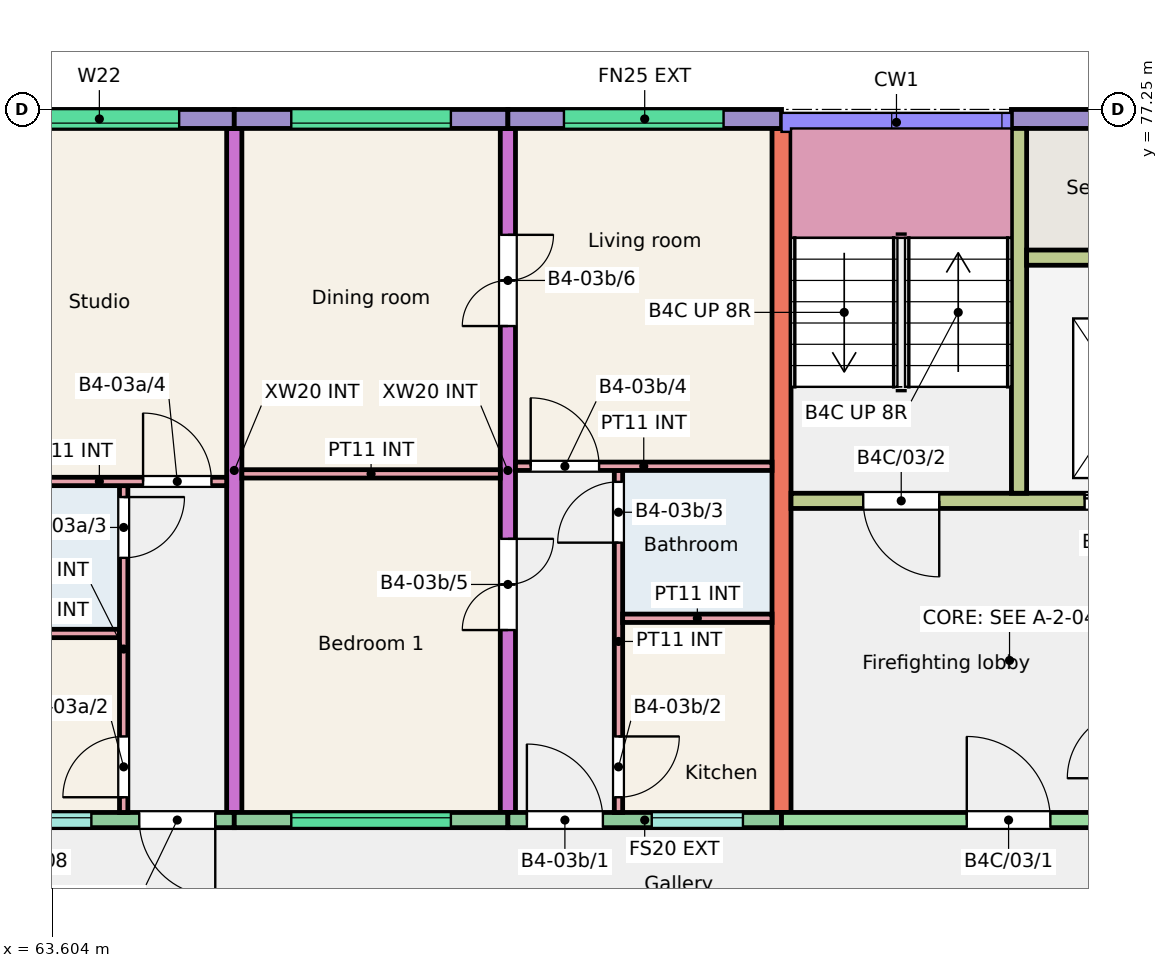
"""IFC4 building model, lengths in metres.
Left out: names, types, materials, properties, quantities, classifications, styles, units other than length and angle.
Written with IfcOpenShell. Run it as: python <this file> out.ifc"""

import sys

from ifc_helpers import new_model, si_unit, direction, frame, frame_2d, origin, place, context, subcontext, project, spatial, rectangle, extrude, element, fill, save


model = new_model("IFC4")
c1 = context("Model", 3, precision=1e-05, world=origin(), true_north=direction((0.0, 1.0)))
c2 = subcontext(c1, "Body", "Model", "MODEL_VIEW")
j1 = project(units=[si_unit("LENGTHUNIT", "METRE"), si_unit("PLANEANGLEUNIT", "RADIAN")], contexts=[c1])
p1 = place(None, origin())
s1 = spatial("IfcSite", under=j1, at=p1, CompositionType="ELEMENT")
p2 = place(p1, origin())
s2 = spatial("IfcBuilding", under=s1, at=p2, CompositionType="ELEMENT")
p3 = place(p2, frame((0.0, 0.0, 9.0)))
s3 = spatial("IfcBuildingStorey", under=s2, at=p3, CompositionType="ELEMENT", Elevation=9.0)
p4 = place(p3, frame((66.0, 68.0, 0.0), z_axis=(0.0, 0.0, 1.0), x_axis=(0.0, 1.0, 0.0)))
e1 = element("IfcWall", 1, at=p4, inside=s3, PredefinedType="SHEAR", context=c2, shape_type="SweptSolid", body=[
    extrude(rectangle(XDim=9.0, YDim=0.2, at=frame_2d((4.5, 0.0))), origin(), (0.0, 0.0, 1.0), 3.0),
])
p5 = place(p3, frame((69.6, 68.0, 0.0), z_axis=(0.0, 0.0, 1.0), x_axis=(0.0, 1.0, 0.0)))
e2 = element("IfcWall", 2, at=p5, inside=s3, PredefinedType="SHEAR", context=c2, shape_type="SweptSolid", body=[
    extrude(rectangle(XDim=9.0, YDim=0.2, at=frame_2d((4.5, 0.0))), origin(), (0.0, 0.0, 1.0), 3.0),
])
p6 = place(p5, frame((2.4, 0.0, 0.0)))
e3 = element("IfcOpeningElement", 3, at=p6, cuts=e2, PredefinedType="OPENING", context=c2, shape_type="SweptSolid", body=[
    extrude(rectangle(XDim=1.2, YDim=2.1, at=frame_2d((0.6, 1.05))), frame((0.0, 0.11, 0.0), z_axis=(0.0, -1.0, 0.0), x_axis=(1.0, 0.0, 0.0)), (0.0, 0.0, 1.0), 0.22),
])
p7 = place(p5, frame((6.4, 0.0, 0.0)))
e4 = element("IfcOpeningElement", 4, at=p7, cuts=e2, PredefinedType="OPENING", context=c2, shape_type="SweptSolid", body=[
    extrude(rectangle(XDim=1.2, YDim=2.1, at=frame_2d((0.6, 1.05))), frame((0.0, 0.11, 0.0), z_axis=(0.0, -1.0, 0.0), x_axis=(1.0, 0.0, 0.0)), (0.0, 0.0, 1.0), 0.22),
])
p8 = place(p3, frame((73.2, 68.0, 0.0), z_axis=(0.0, 0.0, 1.0), x_axis=(0.0, 1.0, 0.0)))
e5 = element("IfcWall", 5, at=p8, inside=s3, PredefinedType="SHEAR", context=c2, shape_type="SweptSolid", body=[
    extrude(rectangle(XDim=9.0, YDim=0.25, at=frame_2d((4.5, 0.0))), origin(), (0.0, 0.0, 1.0), 3.0),
])
p9 = place(p3, frame((62.4, 77.125, 0.0), z_axis=(0.0, 0.0, 1.0), x_axis=(1.0, 0.0, 0.0)))
e6 = element("IfcWall", 6, at=p9, inside=s3, PredefinedType="SOLIDWALL", context=c2, shape_type="SweptSolid", body=[
    extrude(rectangle(XDim=3.6, YDim=0.25, at=frame_2d((1.8, 0.0))), origin(), (0.0, 0.0, 1.0), 3.0),
])
p10 = place(p9, frame((0.775, 0.0, 1.2)))
e7 = element("IfcOpeningElement", 7, at=p10, cuts=e6, PredefinedType="OPENING", context=c2, shape_type="SweptSolid", body=[
    extrude(rectangle(XDim=2.1, YDim=1.2, at=frame_2d((1.05, 0.6))), frame((0.0, 0.135, 0.0), z_axis=(0.0, -1.0, 0.0), x_axis=(1.0, 0.0, 0.0)), (0.0, 0.0, 1.0), 0.27),
])
p11 = place(p3, frame((62.55, 67.9, 0.0), z_axis=(0.0, 0.0, 1.0), x_axis=(1.0, 0.0, 0.0)))
e8 = element("IfcWall", 8, at=p11, inside=s3, PredefinedType="SOLIDWALL", context=c2, shape_type="SweptSolid", body=[
    extrude(rectangle(XDim=3.45, YDim=0.2, at=frame_2d((1.725, 0.0))), origin(), (0.0, 0.0, 1.0), 3.0),
])
p12 = place(p11, frame((0.37, 0.0, 1.1)))
e9 = element("IfcOpeningElement", 9, at=p12, cuts=e8, PredefinedType="OPENING", context=c2, shape_type="SweptSolid", body=[
    extrude(rectangle(XDim=1.2, YDim=1.3, at=frame_2d((0.6, 0.65))), frame((0.0, 0.11, 0.0), z_axis=(0.0, -1.0, 0.0), x_axis=(1.0, 0.0, 0.0)), (0.0, 0.0, 1.0), 0.22),
])
p13 = place(p11, frame((2.2, 0.0, 0.0)))
e10 = element("IfcOpeningElement", 10, at=p13, cuts=e8, PredefinedType="OPENING", context=c2, shape_type="SweptSolid", body=[
    extrude(rectangle(XDim=1.0, YDim=2.1, at=frame_2d((0.5, 1.05))), frame((0.0, 0.11, 0.0), z_axis=(0.0, -1.0, 0.0), x_axis=(1.0, 0.0, 0.0)), (0.0, 0.0, 1.0), 0.22),
])
p14 = place(p3, frame((66.0, 77.125, 0.0), z_axis=(0.0, 0.0, 1.0), x_axis=(1.0, 0.0, 0.0)))
e11 = element("IfcWall", 11, at=p14, inside=s3, PredefinedType="SOLIDWALL", context=c2, shape_type="SweptSolid", body=[
    extrude(rectangle(XDim=3.6, YDim=0.25, at=frame_2d((1.8, 0.0))), origin(), (0.0, 0.0, 1.0), 3.0),
])
p15 = place(p14, frame((0.75, 0.0, 1.2)))
e12 = element("IfcOpeningElement", 12, at=p15, cuts=e11, PredefinedType="OPENING", context=c2, shape_type="SweptSolid", body=[
    extrude(rectangle(XDim=2.1, YDim=1.2, at=frame_2d((1.05, 0.6))), frame((0.0, 0.135, 0.0), z_axis=(0.0, -1.0, 0.0), x_axis=(1.0, 0.0, 0.0)), (0.0, 0.0, 1.0), 0.27),
])
p16 = place(p3, frame((66.0, 67.9, 0.0), z_axis=(0.0, 0.0, 1.0), x_axis=(1.0, 0.0, 0.0)))
e13 = element("IfcWall", 13, at=p16, inside=s3, PredefinedType="SOLIDWALL", context=c2, shape_type="SweptSolid", body=[
    extrude(rectangle(XDim=3.6, YDim=0.2, at=frame_2d((1.8, 0.0))), origin(), (0.0, 0.0, 1.0), 3.0),
])
p17 = place(p16, frame((0.75, 0.0, 1.2)))
e14 = element("IfcOpeningElement", 14, at=p17, cuts=e13, PredefinedType="OPENING", context=c2, shape_type="SweptSolid", body=[
    extrude(rectangle(XDim=2.1, YDim=1.2, at=frame_2d((1.05, 0.6))), frame((0.0, 0.11, 0.0), z_axis=(0.0, -1.0, 0.0), x_axis=(1.0, 0.0, 0.0)), (0.0, 0.0, 1.0), 0.22),
])
p18 = place(p3, frame((69.6, 77.125, 0.0), z_axis=(0.0, 0.0, 1.0), x_axis=(1.0, 0.0, 0.0)))
e15 = element("IfcWall", 15, at=p18, inside=s3, PredefinedType="SOLIDWALL", context=c2, shape_type="SweptSolid", body=[
    extrude(rectangle(XDim=3.6, YDim=0.25, at=frame_2d((1.8, 0.0))), origin(), (0.0, 0.0, 1.0), 3.0),
])
p19 = place(p18, frame((0.738, 0.0, 1.2)))
e16 = element("IfcOpeningElement", 16, at=p19, cuts=e15, PredefinedType="OPENING", context=c2, shape_type="SweptSolid", body=[
    extrude(rectangle(XDim=2.1, YDim=1.2, at=frame_2d((1.05, 0.6))), frame((0.0, 0.135, 0.0), z_axis=(0.0, -1.0, 0.0), x_axis=(1.0, 0.0, 0.0)), (0.0, 0.0, 1.0), 0.27),
])
p20 = place(p3, frame((69.6, 67.9, 0.0), z_axis=(0.0, 0.0, 1.0), x_axis=(1.0, 0.0, 0.0)))
e17 = element("IfcWall", 17, at=p20, inside=s3, PredefinedType="SOLIDWALL", context=c2, shape_type="SweptSolid", body=[
    extrude(rectangle(XDim=3.6, YDim=0.2, at=frame_2d((1.8, 0.0))), origin(), (0.0, 0.0, 1.0), 3.0),
])
p21 = place(p20, frame((1.893, 0.0, 1.1)))
e18 = element("IfcOpeningElement", 18, at=p21, cuts=e17, PredefinedType="OPENING", context=c2, shape_type="SweptSolid", body=[
    extrude(rectangle(XDim=1.2, YDim=1.3, at=frame_2d((0.6, 0.65))), frame((0.0, 0.11, 0.0), z_axis=(0.0, -1.0, 0.0), x_axis=(1.0, 0.0, 0.0)), (0.0, 0.0, 1.0), 0.22),
])
p22 = place(p20, frame((0.25, 0.0, 0.0)))
e19 = element("IfcOpeningElement", 19, at=p22, cuts=e17, PredefinedType="OPENING", context=c2, shape_type="SweptSolid", body=[
    extrude(rectangle(XDim=1.0, YDim=2.1, at=frame_2d((0.5, 1.05))), frame((0.0, 0.11, 0.0), z_axis=(0.0, -1.0, 0.0), x_axis=(1.0, 0.0, 0.0)), (0.0, 0.0, 1.0), 0.22),
])
p23 = place(p3, frame((76.225, 77.125, 0.0), z_axis=(0.0, 0.0, 1.0), x_axis=(1.0, 0.0, 0.0)))
e20 = element("IfcWall", 20, at=p23, inside=s3, PredefinedType="SOLIDWALL", context=c2, shape_type="SweptSolid", body=[
    extrude(rectangle(XDim=2.975, YDim=0.25, at=frame_2d((1.487, 0.0))), origin(), (0.0, 0.0, 1.0), 3.0),
])
p24 = place(p3, frame((73.2, 67.9, 0.0), z_axis=(0.0, 0.0, 1.0), x_axis=(1.0, 0.0, 0.0)))
e21 = element("IfcWall", 21, at=p24, inside=s3, PredefinedType="SHEAR", context=c2, shape_type="SweptSolid", body=[
    extrude(rectangle(XDim=5.85, YDim=0.2, at=frame_2d((2.925, 0.0))), origin(), (0.0, 0.0, 1.0), 3.0),
])
p25 = place(p24, frame((2.438, 0.0, 0.0)))
e22 = element("IfcOpeningElement", 22, at=p25, cuts=e21, PredefinedType="OPENING", context=c2, shape_type="SweptSolid", body=[
    extrude(rectangle(XDim=1.1, YDim=2.1, at=frame_2d((0.55, 1.05))), frame((0.0, 0.11, 0.0), z_axis=(0.0, -1.0, 0.0), x_axis=(1.0, 0.0, 0.0)), (0.0, 0.0, 1.0), 0.22),
])
p26 = place(p3, frame((73.325, 72.1, 0.0), z_axis=(0.0, 0.0, 1.0), x_axis=(1.0, 0.0, 0.0)))
e23 = element("IfcWall", 23, at=p26, inside=s3, PredefinedType="SHEAR", context=c2, shape_type="SweptSolid", body=[
    extrude(rectangle(XDim=5.725, YDim=0.2, at=frame_2d((2.863, 0.0))), origin(), (0.0, 0.0, 1.0), 3.0),
])
p27 = place(p26, frame((0.95, 0.0, 0.0)))
e24 = element("IfcOpeningElement", 24, at=p27, cuts=e23, PredefinedType="OPENING", context=c2, shape_type="SweptSolid", body=[
    extrude(rectangle(XDim=1.0, YDim=2.1, at=frame_2d((0.5, 1.05))), frame((0.0, 0.11, 0.0), z_axis=(0.0, -1.0, 0.0), x_axis=(1.0, 0.0, 0.0)), (0.0, 0.0, 1.0), 0.22),
])
p28 = place(p26, frame((3.863, 0.0, 0.0)))
e25 = element("IfcOpeningElement", 25, at=p28, cuts=e23, PredefinedType="OPENING", context=c2, shape_type="SweptSolid", body=[
    extrude(rectangle(XDim=1.1, YDim=2.1, at=frame_2d((0.55, 1.05))), frame((0.0, 0.11, 0.0), z_axis=(0.0, -1.0, 0.0), x_axis=(1.0, 0.0, 0.0)), (0.0, 0.0, 1.0), 0.22),
])
p29 = place(p3, frame((76.325, 72.2, 0.0), z_axis=(0.0, 0.0, 1.0), x_axis=(0.0, 1.0, 0.0)))
e26 = element("IfcWall", 26, at=p29, inside=s3, PredefinedType="SHEAR", context=c2, shape_type="SweptSolid", body=[
    extrude(rectangle(XDim=4.8, YDim=0.2, at=frame_2d((2.4, 0.0))), origin(), (0.0, 0.0, 1.0), 3.0),
])
p30 = place(p3, frame((76.425, 75.3, 0.0), z_axis=(0.0, 0.0, 1.0), x_axis=(1.0, 0.0, 0.0)))
e27 = element("IfcWall", 27, at=p30, inside=s3, PredefinedType="SHEAR", context=c2, shape_type="SweptSolid", body=[
    extrude(rectangle(XDim=2.625, YDim=0.2, at=frame_2d((1.312, 0.0))), origin(), (0.0, 0.0, 1.0), 3.0),
])
p31 = place(p3, frame((62.55, 70.355, 0.0), z_axis=(0.0, 0.0, 1.0), x_axis=(1.0, 0.0, 0.0)))
e28 = element("IfcWall", 28, at=p31, inside=s3, PredefinedType="PARTITIONING", context=c2, shape_type="SweptSolid", body=[
    extrude(rectangle(XDim=1.94, YDim=0.11, at=frame_2d((0.97, 0.0))), origin(), (0.0, 0.0, 1.0), 2.8),
])
p32 = place(p3, frame((64.545, 68.0, 0.0), z_axis=(0.0, 0.0, 1.0), x_axis=(0.0, 1.0, 0.0)))
e29 = element("IfcWall", 29, at=p32, inside=s3, PredefinedType="PARTITIONING", context=c2, shape_type="SweptSolid", body=[
    extrude(rectangle(XDim=4.3, YDim=0.11, at=frame_2d((2.15, 0.0))), origin(), (0.0, 0.0, 1.0), 2.8),
])
p33 = place(p32, frame((0.2, 0.0, 0.0)))
e30 = element("IfcOpeningElement", 30, at=p33, cuts=e29, PredefinedType="OPENING", context=c2, shape_type="SweptSolid", body=[
    extrude(rectangle(XDim=0.8, YDim=2.1, at=frame_2d((0.4, 1.05))), frame((0.0, 0.065, 0.0), z_axis=(0.0, -1.0, 0.0), x_axis=(1.0, 0.0, 0.0)), (0.0, 0.0, 1.0), 0.13),
])
p34 = place(p32, frame((3.35, 0.0, 0.0)))
e31 = element("IfcOpeningElement", 31, at=p34, cuts=e29, PredefinedType="OPENING", context=c2, shape_type="SweptSolid", body=[
    extrude(rectangle(XDim=0.8, YDim=2.1, at=frame_2d((0.4, 1.05))), frame((0.0, 0.065, 0.0), z_axis=(0.0, -1.0, 0.0), x_axis=(1.0, 0.0, 0.0)), (0.0, 0.0, 1.0), 0.13),
])
p35 = place(p3, frame((62.55, 72.355, 0.0), z_axis=(0.0, 0.0, 1.0), x_axis=(1.0, 0.0, 0.0)))
e32 = element("IfcWall", 32, at=p35, inside=s3, PredefinedType="PARTITIONING", context=c2, shape_type="SweptSolid", body=[
    extrude(rectangle(XDim=3.35, YDim=0.11, at=frame_2d((1.675, 0.0))), origin(), (0.0, 0.0, 1.0), 2.8),
])
p36 = place(p35, frame((2.25, 0.0, 0.0)))
e33 = element("IfcOpeningElement", 33, at=p36, cuts=e32, PredefinedType="OPENING", context=c2, shape_type="SweptSolid", body=[
    extrude(rectangle(XDim=0.9, YDim=2.1, at=frame_2d((0.45, 1.05))), frame((0.0, 0.065, 0.0), z_axis=(0.0, -1.0, 0.0), x_axis=(1.0, 0.0, 0.0)), (0.0, 0.0, 1.0), 0.13),
])
p37 = place(p3, frame((71.055, 68.0, 0.0), z_axis=(0.0, 0.0, 1.0), x_axis=(0.0, 1.0, 0.0)))
e34 = element("IfcWall", 34, at=p37, inside=s3, PredefinedType="PARTITIONING", context=c2, shape_type="SweptSolid", body=[
    extrude(rectangle(XDim=4.5, YDim=0.11, at=frame_2d((2.25, 0.0))), origin(), (0.0, 0.0, 1.0), 2.8),
])
p38 = place(p37, frame((0.2, 0.0, 0.0)))
e35 = element("IfcOpeningElement", 35, at=p38, cuts=e34, PredefinedType="OPENING", context=c2, shape_type="SweptSolid", body=[
    extrude(rectangle(XDim=0.8, YDim=2.1, at=frame_2d((0.4, 1.05))), frame((0.0, 0.065, 0.0), z_axis=(0.0, -1.0, 0.0), x_axis=(1.0, 0.0, 0.0)), (0.0, 0.0, 1.0), 0.13),
])
p39 = place(p37, frame((3.55, 0.0, 0.0)))
e36 = element("IfcOpeningElement", 36, at=p39, cuts=e34, PredefinedType="OPENING", context=c2, shape_type="SweptSolid", body=[
    extrude(rectangle(XDim=0.8, YDim=2.1, at=frame_2d((0.4, 1.05))), frame((0.0, 0.065, 0.0), z_axis=(0.0, -1.0, 0.0), x_axis=(1.0, 0.0, 0.0)), (0.0, 0.0, 1.0), 0.13),
])
p40 = place(p3, frame((71.11, 70.555, 0.0), z_axis=(0.0, 0.0, 1.0), x_axis=(1.0, 0.0, 0.0)))
e37 = element("IfcWall", 37, at=p40, inside=s3, PredefinedType="PARTITIONING", context=c2, shape_type="SweptSolid", body=[
    extrude(rectangle(XDim=1.965, YDim=0.11, at=frame_2d((0.982, 0.0))), origin(), (0.0, 0.0, 1.0), 2.8),
])
p41 = place(p3, frame((69.7, 72.555, 0.0), z_axis=(0.0, 0.0, 1.0), x_axis=(1.0, 0.0, 0.0)))
e38 = element("IfcWall", 38, at=p41, inside=s3, PredefinedType="PARTITIONING", context=c2, shape_type="SweptSolid", body=[
    extrude(rectangle(XDim=3.375, YDim=0.11, at=frame_2d((1.688, 0.0))), origin(), (0.0, 0.0, 1.0), 2.8),
])
p42 = place(p41, frame((0.2, 0.0, 0.0)))
e39 = element("IfcOpeningElement", 39, at=p42, cuts=e38, PredefinedType="OPENING", context=c2, shape_type="SweptSolid", body=[
    extrude(rectangle(XDim=0.9, YDim=2.1, at=frame_2d((0.45, 1.05))), frame((0.0, 0.065, 0.0), z_axis=(0.0, -1.0, 0.0), x_axis=(1.0, 0.0, 0.0)), (0.0, 0.0, 1.0), 0.13),
])
p43 = place(p3, frame((66.1, 72.455, 0.0), z_axis=(0.0, 0.0, 1.0), x_axis=(1.0, 0.0, 0.0)))
e40 = element("IfcWall", 40, at=p43, inside=s3, PredefinedType="PARTITIONING", context=c2, shape_type="SweptSolid", body=[
    extrude(rectangle(XDim=3.4, YDim=0.11, at=frame_2d((1.7, 0.0))), origin(), (0.0, 0.0, 1.0), 2.8),
])
p44 = place(p12, origin())
e41 = element("IfcWindow", 41, at=p44, inside=s3, PartitioningType="SINGLE_PANEL", PredefinedType="WINDOW", context=c2, shape_type="SweptSolid", body=[
    extrude(rectangle(XDim=1.2, YDim=1.3, at=frame_2d((0.6, 0.65))), frame((0.0, 0.06, 0.0), z_axis=(0.0, -1.0, 0.0), x_axis=(1.0, 0.0, 0.0)), (0.0, 0.0, 1.0), 0.06),
])
fill(e9, e41)
p45 = place(p10, origin())
e42 = element("IfcWindow", 42, at=p45, inside=s3, PartitioningType="SINGLE_PANEL", PredefinedType="WINDOW", context=c2, shape_type="SweptSolid", body=[
    extrude(rectangle(XDim=2.1, YDim=1.2, at=frame_2d((1.05, 0.6))), frame((0.0, -0.025, 0.0), z_axis=(0.0, -1.0, 0.0), x_axis=(1.0, 0.0, 0.0)), (0.0, 0.0, 1.0), 0.06),
])
fill(e7, e42)
p46 = place(p17, origin())
e43 = element("IfcWindow", 43, at=p46, inside=s3, PartitioningType="SINGLE_PANEL", PredefinedType="WINDOW", context=c2, shape_type="SweptSolid", body=[
    extrude(rectangle(XDim=2.1, YDim=1.2, at=frame_2d((1.05, 0.6))), frame((0.0, 0.06, 0.0), z_axis=(0.0, -1.0, 0.0), x_axis=(1.0, 0.0, 0.0)), (0.0, 0.0, 1.0), 0.06),
])
fill(e14, e43)
p47 = place(p15, origin())
e44 = element("IfcWindow", 44, at=p47, inside=s3, PartitioningType="SINGLE_PANEL", PredefinedType="WINDOW", context=c2, shape_type="SweptSolid", body=[
    extrude(rectangle(XDim=2.1, YDim=1.2, at=frame_2d((1.05, 0.6))), frame((0.0, -0.025, 0.0), z_axis=(0.0, -1.0, 0.0), x_axis=(1.0, 0.0, 0.0)), (0.0, 0.0, 1.0), 0.06),
])
fill(e12, e44)
p48 = place(p21, origin())
e45 = element("IfcWindow", 45, at=p48, inside=s3, PartitioningType="SINGLE_PANEL", PredefinedType="WINDOW", context=c2, shape_type="SweptSolid", body=[
    extrude(rectangle(XDim=1.2, YDim=1.3, at=frame_2d((0.6, 0.65))), frame((0.0, 0.06, 0.0), z_axis=(0.0, -1.0, 0.0), x_axis=(1.0, 0.0, 0.0)), (0.0, 0.0, 1.0), 0.06),
])
fill(e18, e45)
p49 = place(p19, origin())
e46 = element("IfcWindow", 46, at=p49, inside=s3, PartitioningType="SINGLE_PANEL", PredefinedType="WINDOW", context=c2, shape_type="SweptSolid", body=[
    extrude(rectangle(XDim=2.1, YDim=1.2, at=frame_2d((1.05, 0.6))), frame((0.0, -0.025, 0.0), z_axis=(0.0, -1.0, 0.0), x_axis=(1.0, 0.0, 0.0)), (0.0, 0.0, 1.0), 0.06),
])
fill(e16, e46)
p50 = place(p13, origin())
e47 = element("IfcDoor", 47, at=p50, inside=s3, OperationType="SINGLE_SWING_RIGHT", PredefinedType="DOOR", context=c2, shape_type="SweptSolid", body=[
    extrude(rectangle(XDim=1.0, YDim=2.1, at=frame_2d((0.5, 1.05))), frame((0.0, 0.025, 0.0), z_axis=(0.0, -1.0, 0.0), x_axis=(1.0, 0.0, 0.0)), (0.0, 0.0, 1.0), 0.05),
])
fill(e10, e47)
p51 = place(p33, origin())
e48 = element("IfcDoor", 48, at=p51, inside=s3, OperationType="SINGLE_SWING_LEFT", PredefinedType="DOOR", context=c2, shape_type="SweptSolid", body=[
    extrude(rectangle(XDim=0.8, YDim=2.1, at=frame_2d((0.4, 1.05))), frame((0.0, 0.025, 0.0), z_axis=(0.0, -1.0, 0.0), x_axis=(1.0, 0.0, 0.0)), (0.0, 0.0, 1.0), 0.05),
])
fill(e30, e48)
p52 = place(p34, origin())
e49 = element("IfcDoor", 49, at=p52, inside=s3, OperationType="SINGLE_SWING_RIGHT", PredefinedType="DOOR", context=c2, shape_type="SweptSolid", body=[
    extrude(rectangle(XDim=0.8, YDim=2.1, at=frame_2d((0.4, 1.05))), frame((0.0, 0.025, 0.0), z_axis=(0.0, -1.0, 0.0), x_axis=(1.0, 0.0, 0.0)), (0.0, 0.0, 1.0), 0.05),
])
fill(e31, e49)
p53 = place(p36, origin())
e50 = element("IfcDoor", 50, at=p53, inside=s3, OperationType="SINGLE_SWING_LEFT", PredefinedType="DOOR", context=c2, shape_type="SweptSolid", body=[
    extrude(rectangle(XDim=0.9, YDim=2.1, at=frame_2d((0.45, 1.05))), frame((0.0, 0.025, 0.0), z_axis=(0.0, -1.0, 0.0), x_axis=(1.0, 0.0, 0.0)), (0.0, 0.0, 1.0), 0.05),
])
fill(e33, e50)
p54 = place(p22, origin())
e51 = element("IfcDoor", 51, at=p54, inside=s3, OperationType="SINGLE_SWING_LEFT", PredefinedType="DOOR", context=c2, shape_type="SweptSolid", body=[
    extrude(rectangle(XDim=1.0, YDim=2.1, at=frame_2d((0.5, 1.05))), frame((0.0, 0.025, 0.0), z_axis=(0.0, -1.0, 0.0), x_axis=(1.0, 0.0, 0.0)), (0.0, 0.0, 1.0), 0.05),
])
fill(e19, e51)
p55 = place(p38, origin())
e52 = element("IfcDoor", 52, at=p55, inside=s3, OperationType="SINGLE_SWING_RIGHT", PredefinedType="DOOR", context=c2, shape_type="SweptSolid", body=[
    extrude(rectangle(XDim=0.8, YDim=2.1, at=frame_2d((0.4, 1.05))), frame((0.0, 0.025, 0.0), z_axis=(0.0, -1.0, 0.0), x_axis=(1.0, 0.0, 0.0)), (0.0, 0.0, 1.0), 0.05),
])
fill(e35, e52)
p56 = place(p39, origin())
e53 = element("IfcDoor", 53, at=p56, inside=s3, OperationType="SINGLE_SWING_LEFT", PredefinedType="DOOR", context=c2, shape_type="SweptSolid", body=[
    extrude(rectangle(XDim=0.8, YDim=2.1, at=frame_2d((0.4, 1.05))), frame((0.0, 0.025, 0.0), z_axis=(0.0, -1.0, 0.0), x_axis=(1.0, 0.0, 0.0)), (0.0, 0.0, 1.0), 0.05),
])
fill(e36, e53)
p57 = place(p42, origin())
e54 = element("IfcDoor", 54, at=p57, inside=s3, OperationType="SINGLE_SWING_LEFT", PredefinedType="DOOR", context=c2, shape_type="SweptSolid", body=[
    extrude(rectangle(XDim=0.9, YDim=2.1, at=frame_2d((0.45, 1.05))), frame((0.0, 0.025, 0.0), z_axis=(0.0, -1.0, 0.0), x_axis=(1.0, 0.0, 0.0)), (0.0, 0.0, 1.0), 0.05),
])
fill(e39, e54)
p58 = place(p6, origin())
e55 = element("IfcDoor", 55, at=p58, inside=s3, OperationType="DOUBLE_DOOR_SINGLE_SWING", PredefinedType="DOOR", context=c2, shape_type="SweptSolid", body=[
    extrude(rectangle(XDim=1.2, YDim=2.1, at=frame_2d((0.6, 1.05))), frame((0.0, 0.025, 0.0), z_axis=(0.0, -1.0, 0.0), x_axis=(1.0, 0.0, 0.0)), (0.0, 0.0, 1.0), 0.05),
])
fill(e3, e55)
p59 = place(p7, origin())
e56 = element("IfcDoor", 56, at=p59, inside=s3, OperationType="DOUBLE_DOOR_SINGLE_SWING", PredefinedType="DOOR", context=c2, shape_type="SweptSolid", body=[
    extrude(rectangle(XDim=1.2, YDim=2.1, at=frame_2d((0.6, 1.05))), frame((0.0, 0.025, 0.0), z_axis=(0.0, -1.0, 0.0), x_axis=(1.0, 0.0, 0.0)), (0.0, 0.0, 1.0), 0.05),
])
fill(e4, e56)
p60 = place(p25, origin())
e57 = element("IfcDoor", 57, at=p60, inside=s3, OperationType="SINGLE_SWING_LEFT", PredefinedType="DOOR", context=c2, shape_type="SweptSolid", body=[
    extrude(rectangle(XDim=1.1, YDim=2.1, at=frame_2d((0.55, 1.05))), frame((0.0, 0.025, 0.0), z_axis=(0.0, -1.0, 0.0), x_axis=(1.0, 0.0, 0.0)), (0.0, 0.0, 1.0), 0.05),
])
fill(e22, e57)
p61 = place(p27, origin())
e58 = element("IfcDoor", 58, at=p61, inside=s3, OperationType="SINGLE_SWING_RIGHT", PredefinedType="DOOR", context=c2, shape_type="SweptSolid", body=[
    extrude(rectangle(XDim=1.0, YDim=2.1, at=frame_2d((0.5, 1.05))), frame((0.0, 0.025, 0.0), z_axis=(0.0, -1.0, 0.0), x_axis=(1.0, 0.0, 0.0)), (0.0, 0.0, 1.0), 0.05),
])
fill(e24, e58)
p62 = place(p28, origin())
e59 = element("IfcDoor", 59, at=p62, inside=s3, OperationType="DOUBLE_DOOR_SLIDING", PredefinedType="DOOR", context=c2, shape_type="SweptSolid", body=[
    extrude(rectangle(XDim=1.1, YDim=2.1, at=frame_2d((0.55, 1.05))), frame((0.0, 0.025, 0.0), z_axis=(0.0, -1.0, 0.0), x_axis=(1.0, 0.0, 0.0)), (0.0, 0.0, 1.0), 0.05),
])
fill(e25, e59)
save(model, sys.argv[1])
